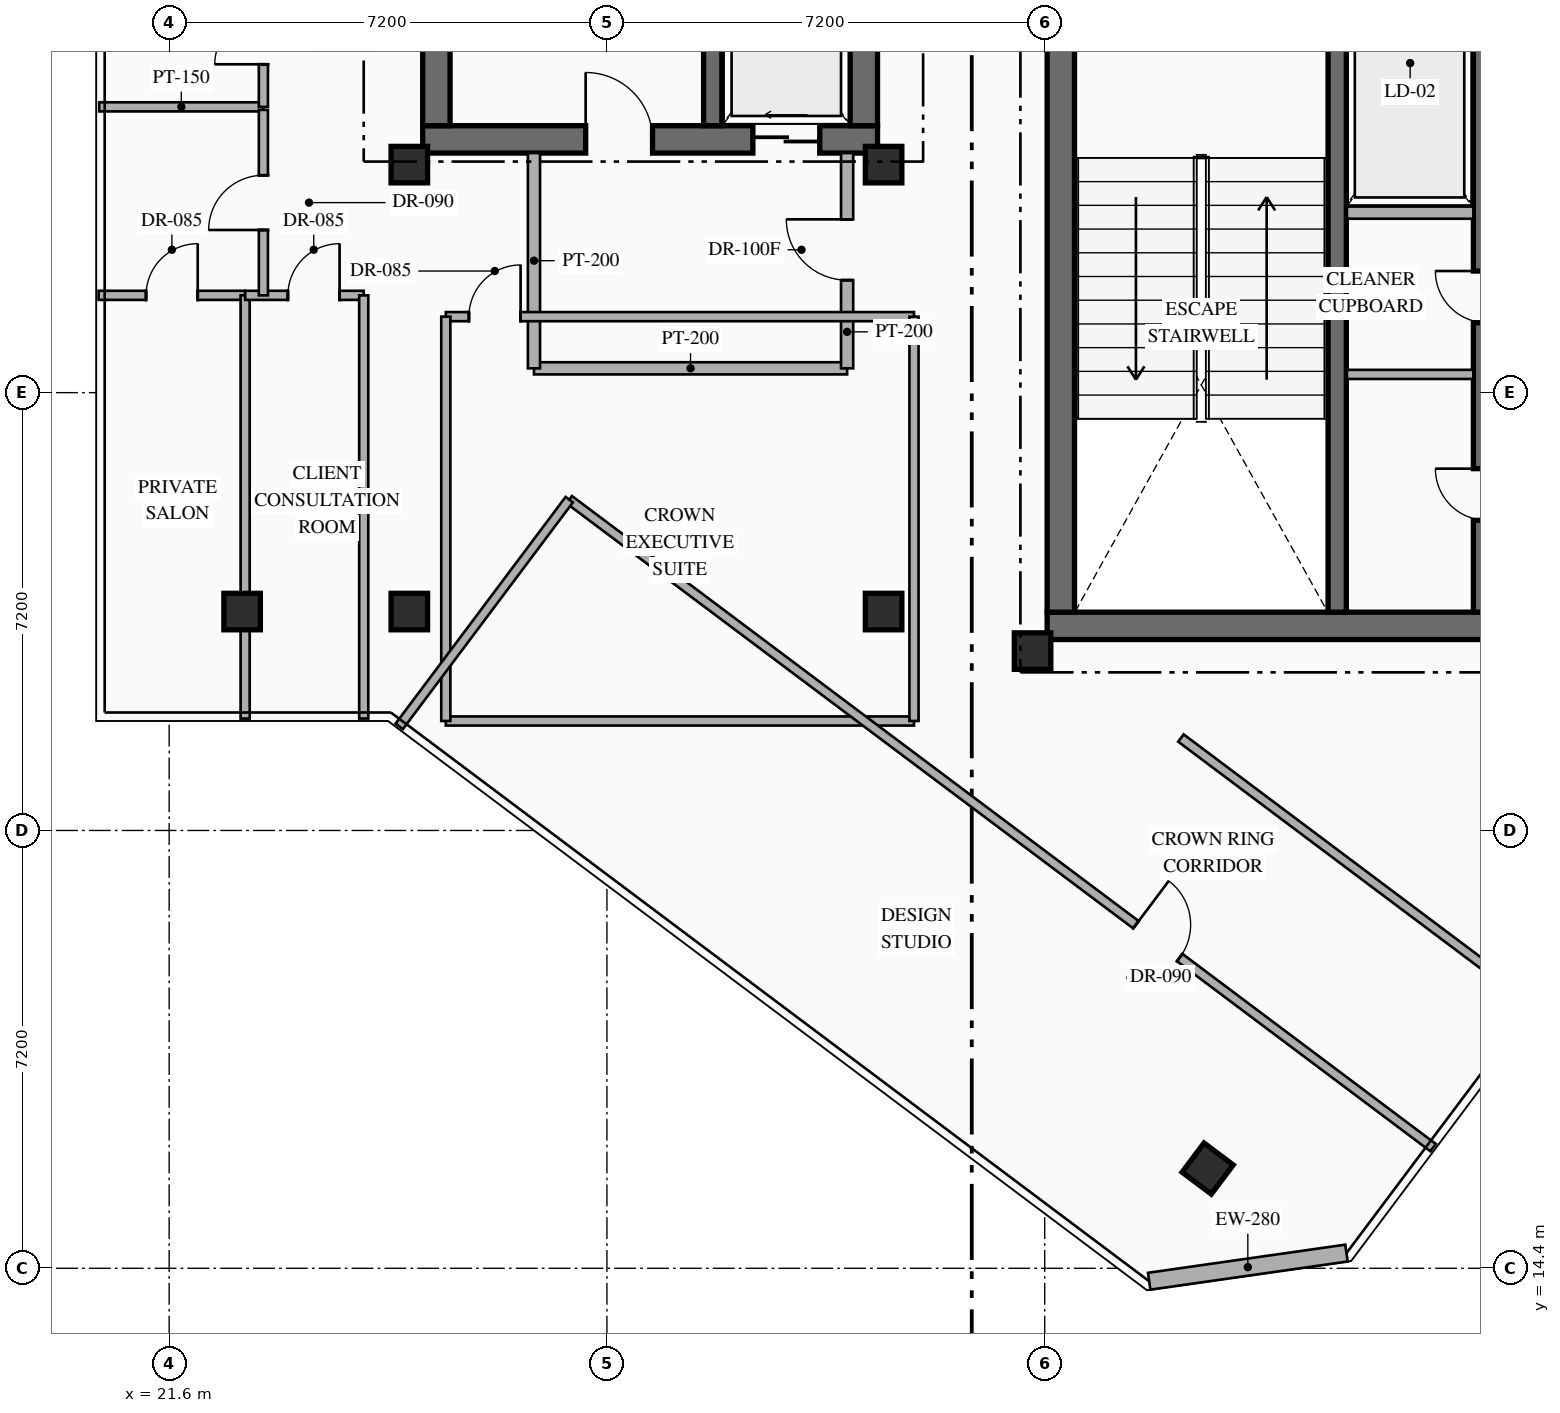
"""IFC4 building model, lengths in metres.
Left out: names, types, materials, properties, quantities, classifications, styles, units other than length and angle.
Written with IfcOpenShell. Run it as: python <this file> out.ifc"""

import sys

from ifc_helpers import new_model, si_unit, direction, frame, frame_2d, origin, origin_2d, place, context, subcontext, project, spatial, rectangle, hollow_rectangle, extrude, element, fill, save


model = new_model("IFC4")
c1 = context("Model", 3, precision=1e-05, world=origin(), true_north=direction((0.0, 1.0)))
c2 = subcontext(c1, "Body", "Model", "MODEL_VIEW")
j1 = project(units=[si_unit("LENGTHUNIT", "METRE"), si_unit("PLANEANGLEUNIT", "RADIAN")], contexts=[c1])
p1 = place(None, origin())
s1 = spatial("IfcSite", under=j1, at=p1, CompositionType="ELEMENT")
p2 = place(p1, origin())
s2 = spatial("IfcBuilding", under=s1, at=p2, CompositionType="ELEMENT")
p3 = place(p2, frame((0.0, 0.0, 277.95)))
s3 = spatial("IfcBuildingStorey", under=s2, at=p3, CompositionType="ELEMENT", Elevation=277.95)
p4 = place(p3, frame((25.77, 32.965, 0.0), z_axis=(0.0, 0.0, 1.0), x_axis=(1.0, 0.0, 0.0)))
e1 = element("IfcWall", 1, at=p4, inside=s3, PredefinedType="SHEAR", context=c2, shape_type="SweptSolid", body=[
    extrude(rectangle(XDim=7.48, YDim=0.45, at=frame_2d((3.74, 0.0))), origin(), (0.0, 0.0, 1.0), 4.0),
])
p5 = place(p4, frame((2.68, 0.0, 0.0)))
e2 = element("IfcOpeningElement", 2, at=p5, cuts=e1, PredefinedType="OPENING", context=c2, shape_type="SweptSolid", body=[
    extrude(rectangle(XDim=1.1, YDim=2.2, at=frame_2d((0.55, 1.1))), frame((0.0, 0.235, 0.0), z_axis=(0.0, -1.0, 0.0), x_axis=(1.0, 0.0, 0.0)), (0.0, 0.0, 1.0), 0.47),
])
p6 = place(p4, frame((5.43, 0.0, 0.0)))
e3 = element("IfcOpeningElement", 3, at=p6, cuts=e1, PredefinedType="OPENING", context=c2, shape_type="SweptSolid", body=[
    extrude(rectangle(XDim=1.1, YDim=2.15, at=frame_2d((0.55, 1.075))), frame((0.0, 0.235, 0.0), z_axis=(0.0, -1.0, 0.0), x_axis=(1.0, 0.0, 0.0)), (0.0, 0.0, 1.0), 0.47),
])
p7 = place(p3, frame((25.995, 33.19, 0.0), z_axis=(0.0, 0.0, 1.0), x_axis=(0.0, 1.0, 0.0)))
e4 = element("IfcWall", 4, at=p7, inside=s3, PredefinedType="SHEAR", context=c2, shape_type="SweptSolid", body=[
    extrude(rectangle(XDim=9.48, YDim=0.45, at=frame_2d((4.74, 0.0))), origin(), (0.0, 0.0, 1.0), 4.0),
])
p8 = place(p3, frame((33.025, 33.19, 0.0), z_axis=(0.0, 0.0, 1.0), x_axis=(0.0, 1.0, 0.0)))
e5 = element("IfcWall", 5, at=p8, inside=s3, PredefinedType="SHEAR", context=c2, shape_type="SweptSolid", body=[
    extrude(rectangle(XDim=9.48, YDim=0.45, at=frame_2d((4.74, 0.0))), origin(), (0.0, 0.0, 1.0), 4.0),
])
p9 = place(p8, frame((4.71, 0.0, 0.0)))
e6 = element("IfcOpeningElement", 6, at=p9, cuts=e5, PredefinedType="OPENING", context=c2, shape_type="SweptSolid", body=[
    extrude(rectangle(XDim=0.85, YDim=2.08, at=frame_2d((0.425, 1.04))), frame((0.0, 0.235, 0.0), z_axis=(0.0, -1.0, 0.0), x_axis=(1.0, 0.0, 0.0)), (0.0, 0.0, 1.0), 0.47),
])
p10 = place(p8, frame((7.76, 0.0, 0.0)))
e7 = element("IfcOpeningElement", 7, at=p10, cuts=e5, PredefinedType="OPENING", context=c2, shape_type="SweptSolid", body=[
    extrude(rectangle(XDim=0.85, YDim=2.08, at=frame_2d((0.425, 1.04))), frame((0.0, 0.235, 0.0), z_axis=(0.0, -1.0, 0.0), x_axis=(1.0, 0.0, 0.0)), (0.0, 0.0, 1.0), 0.47),
])
p11 = place(p3, frame((30.54, 33.19, 0.0), z_axis=(0.0, 0.0, 1.0), x_axis=(0.0, 1.0, 0.0)))
e8 = element("IfcWall", 8, at=p11, inside=s3, PredefinedType="SHEAR", context=c2, shape_type="SweptSolid", body=[
    extrude(rectangle(XDim=9.48, YDim=0.3, at=frame_2d((4.74, 0.0))), origin(), (0.0, 0.0, 1.0), 4.0),
])
p12 = place(p3, frame((36.04, 24.965, 0.0), z_axis=(0.0, 0.0, 1.0), x_axis=(1.0, 0.0, 0.0)))
e9 = element("IfcWall", 9, at=p12, inside=s3, PredefinedType="SHEAR", context=c2, shape_type="SweptSolid", body=[
    extrude(rectangle(XDim=7.46, YDim=0.45, at=frame_2d((3.73, 0.0))), origin(), (0.0, 0.0, 1.0), 4.0),
])
p13 = place(p3, frame((36.265, 25.19, 0.0), z_axis=(0.0, 0.0, 1.0), x_axis=(0.0, 1.0, 0.0)))
e10 = element("IfcWall", 10, at=p13, inside=s3, PredefinedType="SHEAR", context=c2, shape_type="SweptSolid", body=[
    extrude(rectangle(XDim=9.48, YDim=0.45, at=frame_2d((4.74, 0.0))), origin(), (0.0, 0.0, 1.0), 4.0),
])
p14 = place(p3, frame((43.275, 25.19, 0.0), z_axis=(0.0, 0.0, 1.0), x_axis=(0.0, 1.0, 0.0)))
e11 = element("IfcWall", 11, at=p14, inside=s3, PredefinedType="SHEAR", context=c2, shape_type="SweptSolid", body=[
    extrude(rectangle(XDim=9.48, YDim=0.45, at=frame_2d((4.74, 0.0))), origin(), (0.0, 0.0, 1.0), 4.0),
])
p15 = place(p14, frame((1.51, 0.0, 0.0)))
e12 = element("IfcOpeningElement", 12, at=p15, cuts=e11, PredefinedType="OPENING", context=c2, shape_type="SweptSolid", body=[
    extrude(rectangle(XDim=0.85, YDim=2.08, at=frame_2d((0.425, 1.04))), frame((0.0, 0.235, 0.0), z_axis=(0.0, -1.0, 0.0), x_axis=(1.0, 0.0, 0.0)), (0.0, 0.0, 1.0), 0.47),
])
p16 = place(p14, frame((4.76, 0.0, 0.0)))
e13 = element("IfcOpeningElement", 13, at=p16, cuts=e11, PredefinedType="OPENING", context=c2, shape_type="SweptSolid", body=[
    extrude(rectangle(XDim=0.85, YDim=2.08, at=frame_2d((0.425, 1.04))), frame((0.0, 0.235, 0.0), z_axis=(0.0, -1.0, 0.0), x_axis=(1.0, 0.0, 0.0)), (0.0, 0.0, 1.0), 0.47),
])
p17 = place(p3, frame((40.81, 25.19, 0.0), z_axis=(0.0, 0.0, 1.0), x_axis=(0.0, 1.0, 0.0)))
e14 = element("IfcWall", 14, at=p17, inside=s3, PredefinedType="SHEAR", context=c2, shape_type="SweptSolid", body=[
    extrude(rectangle(XDim=9.48, YDim=0.3, at=frame_2d((4.74, 0.0))), origin(), (0.0, 0.0, 1.0), 4.0),
])
for number, where, z_axis, x_axis in (
    (15, (25.55, 32.55, 0.0), (0.0, 0.0, 1.0), (1.0, 0.0, 0.0)),
    (16, (33.35, 32.55, 0.0), (0.0, 0.0, 1.0), (1.0, 0.0, 0.0)),
    (17, (35.8, 24.55, 0.0), (0.0, 0.0, 1.0), (1.0, 0.0, 0.0)),
    (18, (25.55, 25.2, 0.0), (0.0, 0.0, 1.0), (1.0, 0.0, 0.0)),
    (19, (33.35, 25.2, 0.0), (0.0, 0.0, 1.0), (1.0, 0.0, 0.0)),
    (20, (22.8, 25.2, 0.0), (0.0, 0.0, 1.0), (1.0, 0.0, 0.0)),
    (21, (38.68, 16.04, 0.0), (0.0, 0.0, 1.0), (0.8, -0.6, 0.0)),
):
    element("IfcColumn", number, at=place(p3, frame(where, z_axis=z_axis, x_axis=x_axis)), inside=s3, PredefinedType="COLUMN", context=c2, shape_type="SweptSolid", body=[
        extrude(hollow_rectangle(XDim=0.6, YDim=0.6, WallThickness=0.025, at=origin_2d()), origin(), (0.0, 0.0, 1.0), 4.0),
    ])
p18 = place(p3, frame((40.963, 14.65, 0.0), z_axis=(0.0, 0.0, 1.0), x_axis=(-0.989977778067, -0.141223223777, 0.0)))
e22 = element("IfcWall", 22, at=p18, inside=s3, PredefinedType="STANDARD", context=c2, shape_type="SweptSolid", body=[
    extrude(rectangle(XDim=3.278, YDim=0.28, at=frame_2d((1.639, 0.0))), origin(), (0.0, 0.0, 1.0), 3.74),
])
p19 = place(p3, frame((40.97, 31.76, 0.0), z_axis=(0.0, 0.0, 1.0), x_axis=(1.0, 0.0, 0.0)))
e23 = element("IfcWall", 23, at=p19, inside=s3, PredefinedType="STANDARD", context=c2, shape_type="SweptSolid", body=[
    extrude(rectangle(XDim=2.08, YDim=0.2, at=frame_2d((1.04, 0.0))), origin(), (0.0, 0.0, 1.0), 3.74),
])
p20 = place(p3, frame((40.97, 29.1, 0.0), z_axis=(0.0, 0.0, 1.0), x_axis=(1.0, 0.0, 0.0)))
e24 = element("IfcWall", 24, at=p20, inside=s3, PredefinedType="PARTITIONING", context=c2, shape_type="SweptSolid", body=[
    extrude(rectangle(XDim=2.08, YDim=0.15, at=frame_2d((1.04, 0.0))), origin(), (0.0, 0.0, 1.0), 3.74),
])
p21 = place(p3, frame((27.6, 29.2, 0.0), z_axis=(0.0, 0.0, 1.0), x_axis=(1.0, 0.0, 0.0)))
e25 = element("IfcWall", 25, at=p21, inside=s3, PredefinedType="STANDARD", context=c2, shape_type="SweptSolid", body=[
    extrude(rectangle(XDim=5.15, YDim=0.2, at=frame_2d((2.575, 0.0))), origin(), (0.0, 0.0, 1.0), 3.74),
])
p22 = place(p3, frame((27.6, 29.2, 0.0), z_axis=(0.0, 0.0, 1.0), x_axis=(0.0, 1.0, 0.0)))
e26 = element("IfcWall", 26, at=p22, inside=s3, PredefinedType="STANDARD", context=c2, shape_type="SweptSolid", body=[
    extrude(rectangle(XDim=3.54, YDim=0.2, at=frame_2d((1.77, 0.0))), origin(), (0.0, 0.0, 1.0), 3.74),
])
p23 = place(p3, frame((32.75, 29.2, 0.0), z_axis=(0.0, 0.0, 1.0), x_axis=(0.0, 1.0, 0.0)))
e27 = element("IfcWall", 27, at=p23, inside=s3, PredefinedType="STANDARD", context=c2, shape_type="SweptSolid", body=[
    extrude(rectangle(XDim=3.54, YDim=0.2, at=frame_2d((1.77, 0.0))), origin(), (0.0, 0.0, 1.0), 3.74),
])
p24 = place(p23, frame((1.45, 0.0, 0.0)))
e28 = element("IfcOpeningElement", 28, at=p24, cuts=e27, PredefinedType="OPENING", context=c2, shape_type="SweptSolid", body=[
    extrude(rectangle(XDim=1.0, YDim=2.2, at=frame_2d((0.5, 1.1))), frame((0.0, 0.11, 0.0), z_axis=(0.0, -1.0, 0.0), x_axis=(1.0, 0.0, 0.0)), (0.0, 0.0, 1.0), 0.22),
])
p25 = place(p3, frame((20.45, 33.5, 0.0), z_axis=(0.0, 0.0, 1.0), x_axis=(1.0, 0.0, 0.0)))
e29 = element("IfcWall", 29, at=p25, inside=s3, PredefinedType="PARTITIONING", context=c2, shape_type="SweptSolid", body=[
    extrude(rectangle(XDim=2.7, YDim=0.15, at=frame_2d((1.35, 0.0))), origin(), (0.0, 0.0, 1.0), 3.74),
])
p26 = place(p3, frame((23.15, 33.5, 0.0), z_axis=(0.0, 0.0, 1.0), x_axis=(0.0, 1.0, 0.0)))
e30 = element("IfcWall", 30, at=p26, inside=s3, PredefinedType="PARTITIONING", context=c2, shape_type="SweptSolid", body=[
    extrude(rectangle(XDim=2.2, YDim=0.15, at=frame_2d((1.1, 0.0))), origin(), (0.0, 0.0, 1.0), 3.74),
])
p27 = place(p26, frame((0.7, 0.0, 0.0)))
e31 = element("IfcOpeningElement", 31, at=p27, cuts=e30, PredefinedType="OPENING", context=c2, shape_type="SweptSolid", body=[
    extrude(rectangle(XDim=0.8, YDim=2.06, at=frame_2d((0.4, 1.03))), frame((0.0, 0.085, 0.0), z_axis=(0.0, -1.0, 0.0), x_axis=(1.0, 0.0, 0.0)), (0.0, 0.0, 1.0), 0.17),
])
p28 = place(p3, frame((26.15, 23.4, 0.0), z_axis=(0.0, 0.0, 1.0), x_axis=(1.0, 0.0, 0.0)))
e32 = element("IfcWall", 32, at=p28, inside=s3, PredefinedType="PARTITIONING", context=c2, shape_type="SweptSolid", body=[
    extrude(rectangle(XDim=7.7, YDim=0.15, at=frame_2d((3.85, 0.0))), origin(), (0.0, 0.0, 1.0), 3.74),
])
p29 = place(p3, frame((26.15, 30.05, 0.0), z_axis=(0.0, 0.0, 1.0), x_axis=(1.0, 0.0, 0.0)))
e33 = element("IfcWall", 33, at=p29, inside=s3, PredefinedType="PARTITIONING", context=c2, shape_type="SweptSolid", body=[
    extrude(rectangle(XDim=7.7, YDim=0.15, at=frame_2d((3.85, 0.0))), origin(), (0.0, 0.0, 1.0), 3.74),
])
p30 = place(p29, frame((0.38, 0.0, 0.0)))
e34 = element("IfcOpeningElement", 34, at=p30, cuts=e33, PredefinedType="OPENING", context=c2, shape_type="SweptSolid", body=[
    extrude(rectangle(XDim=0.85, YDim=2.08, at=frame_2d((0.425, 1.04))), frame((0.0, 0.085, 0.0), z_axis=(0.0, -1.0, 0.0), x_axis=(1.0, 0.0, 0.0)), (0.0, 0.0, 1.0), 0.17),
])
for number, where, z_axis, x_axis in (
    (35, (26.15, 23.4, 0.0), (0.0, 0.0, 1.0), (0.0, 1.0, 0.0)),
    (36, (33.85, 23.4, 0.0), (0.0, 0.0, 1.0), (0.0, 1.0, 0.0)),
):
    element("IfcWall", number, at=place(p3, frame(where, z_axis=z_axis, x_axis=x_axis)), inside=s3, PredefinedType="PARTITIONING", context=c2, shape_type="SweptSolid", body=[
        extrude(rectangle(XDim=6.65, YDim=0.15, at=frame_2d((3.325, 0.0))), origin(), (0.0, 0.0, 1.0), 3.74),
    ])
p31 = place(p3, frame((28.18, 27.04, 0.0), z_axis=(0.0, 0.0, 1.0), x_axis=(0.8, -0.6, 0.0)))
e37 = element("IfcWall", 37, at=p31, inside=s3, PredefinedType="PARTITIONING", context=c2, shape_type="SweptSolid", body=[
    extrude(rectangle(XDim=17.76, YDim=0.15, at=frame_2d((8.88, 0.0))), origin(), (0.0, 0.0, 1.0), 3.74),
])
p32 = place(p31, frame((11.65, 0.0, 0.0)))
e38 = element("IfcOpeningElement", 38, at=p32, cuts=e37, PredefinedType="OPENING", context=c2, shape_type="SweptSolid", body=[
    extrude(rectangle(XDim=0.9, YDim=2.15, at=frame_2d((0.45, 1.075))), frame((0.0, 0.085, 0.0), z_axis=(0.0, -1.0, 0.0), x_axis=(1.0, 0.0, 0.0)), (0.0, 0.0, 1.0), 0.17),
])
p33 = place(p3, frame((25.384, 23.312, 0.0), z_axis=(0.0, 0.0, 1.0), x_axis=(0.599983234706, 0.800012573696, 0.0)))
e39 = element("IfcWall", 39, at=p33, inside=s3, PredefinedType="PARTITIONING", context=c2, shape_type="SweptSolid", body=[
    extrude(rectangle(XDim=4.66, YDim=0.15, at=frame_2d((2.33, 0.0))), origin(), (0.0, 0.0, 1.0), 3.74),
])
p34 = place(p3, frame((20.44, 30.4, 0.0), z_axis=(0.0, 0.0, 1.0), x_axis=(1.0, 0.0, 0.0)))
e40 = element("IfcWall", 40, at=p34, inside=s3, PredefinedType="PARTITIONING", context=c2, shape_type="SweptSolid", body=[
    extrude(rectangle(XDim=2.41, YDim=0.15, at=frame_2d((1.205, 0.0))), origin(), (0.0, 0.0, 1.0), 3.74),
])
p35 = place(p34, frame((0.78, 0.0, 0.0)))
e41 = element("IfcOpeningElement", 41, at=p35, cuts=e40, PredefinedType="OPENING", context=c2, shape_type="SweptSolid", body=[
    extrude(rectangle(XDim=0.85, YDim=2.08, at=frame_2d((0.425, 1.04))), frame((0.0, 0.085, 0.0), z_axis=(0.0, -1.0, 0.0), x_axis=(1.0, 0.0, 0.0)), (0.0, 0.0, 1.0), 0.17),
])
p36 = place(p3, frame((22.85, 23.44, 0.0), z_axis=(0.0, 0.0, 1.0), x_axis=(0.0, 1.0, 0.0)))
e42 = element("IfcWall", 42, at=p36, inside=s3, PredefinedType="PARTITIONING", context=c2, shape_type="SweptSolid", body=[
    extrude(rectangle(XDim=6.96, YDim=0.15, at=frame_2d((3.48, 0.0))), origin(), (0.0, 0.0, 1.0), 3.295),
])
p37 = place(p3, frame((22.85, 30.4, 0.0), z_axis=(0.0, 0.0, 1.0), x_axis=(1.0, 0.0, 0.0)))
e43 = element("IfcWall", 43, at=p37, inside=s3, PredefinedType="PARTITIONING", context=c2, shape_type="SweptSolid", body=[
    extrude(rectangle(XDim=1.95, YDim=0.15, at=frame_2d((0.975, 0.0))), origin(), (0.0, 0.0, 1.0), 3.74),
])
p38 = place(p37, frame((0.703, 0.0, 0.0)))
e44 = element("IfcOpeningElement", 44, at=p38, cuts=e43, PredefinedType="OPENING", context=c2, shape_type="SweptSolid", body=[
    extrude(rectangle(XDim=0.85, YDim=2.08, at=frame_2d((0.425, 1.04))), frame((0.0, 0.085, 0.0), z_axis=(0.0, -1.0, 0.0), x_axis=(1.0, 0.0, 0.0)), (0.0, 0.0, 1.0), 0.17),
])
p39 = place(p3, frame((24.8, 23.44, 0.0), z_axis=(0.0, 0.0, 1.0), x_axis=(0.0, 1.0, 0.0)))
e45 = element("IfcWall", 45, at=p39, inside=s3, PredefinedType="PARTITIONING", context=c2, shape_type="SweptSolid", body=[
    extrude(rectangle(XDim=6.96, YDim=0.15, at=frame_2d((3.48, 0.0))), origin(), (0.0, 0.0, 1.0), 3.74),
])
p40 = place(p3, frame((23.15, 30.4, 0.0), z_axis=(0.0, 0.0, 1.0), x_axis=(0.0, 1.0, 0.0)))
e46 = element("IfcWall", 46, at=p40, inside=s3, PredefinedType="PARTITIONING", context=c2, shape_type="SweptSolid", body=[
    extrude(rectangle(XDim=3.05, YDim=0.15, at=frame_2d((1.525, 0.0))), origin(), (0.0, 0.0, 1.0), 3.74),
])
p41 = place(p40, frame((1.075, 0.0, 0.0)))
e47 = element("IfcOpeningElement", 47, at=p41, cuts=e46, PredefinedType="OPENING", context=c2, shape_type="SweptSolid", body=[
    extrude(rectangle(XDim=0.9, YDim=2.15, at=frame_2d((0.45, 1.075))), frame((0.0, 0.085, 0.0), z_axis=(0.0, -1.0, 0.0), x_axis=(1.0, 0.0, 0.0)), (0.0, 0.0, 1.0), 0.17),
])
p42 = place(p3, frame((38.24, 23.12, 0.0), z_axis=(0.0, 0.0, 1.0), x_axis=(0.799996019408, -0.60000530742, 0.0)))
e48 = element("IfcWall", 48, at=p42, inside=s3, PredefinedType="PARTITIONING", context=c2, shape_type="SweptSolid", body=[
    extrude(rectangle(XDim=7.36, YDim=0.15, at=frame_2d((3.68, 0.0))), origin(), (0.0, 0.0, 1.0), 3.74),
])
p43 = place(p3, frame((42.94, 36.72, 0.0), z_axis=(0.0, 0.0, 1.0), x_axis=(0.800013316712, -0.599982243973, 0.0)))
e49 = element("IfcWall", 49, at=p43, inside=s3, PredefinedType="PARTITIONING", context=c2, shape_type="SweptSolid", body=[
    extrude(rectangle(XDim=4.4, YDim=0.15, at=frame_2d((2.2, 0.0))), origin(), (0.0, 0.0, 1.0), 3.295),
])
p44 = place(p5, origin())
e50 = element("IfcDoor", 50, at=p44, inside=s3, OperationType="SINGLE_SWING_LEFT", PredefinedType="DOOR", context=c2, shape_type="SweptSolid", body=[
    extrude(rectangle(XDim=1.1, YDim=2.2, at=frame_2d((0.55, 1.1))), frame((0.0, 0.025, 0.0), z_axis=(0.0, -1.0, 0.0), x_axis=(1.0, 0.0, 0.0)), (0.0, 0.0, 1.0), 0.05),
])
fill(e2, e50)
p45 = place(p6, origin())
e51 = element("IfcDoor", 51, at=p45, inside=s3, OperationType="SLIDING_TO_LEFT", PredefinedType="USERDEFINED", context=c2, shape_type="SweptSolid", body=[
    extrude(rectangle(XDim=1.1, YDim=2.15, at=frame_2d((0.55, 1.075))), frame((0.0, 0.025, 0.0), z_axis=(0.0, -1.0, 0.0), x_axis=(1.0, 0.0, 0.0)), (0.0, 0.0, 1.0), 0.05),
])
fill(e3, e51)
p46 = place(p24, origin())
e52 = element("IfcDoor", 52, at=p46, inside=s3, OperationType="SINGLE_SWING_RIGHT", PredefinedType="DOOR", context=c2, shape_type="SweptSolid", body=[
    extrude(rectangle(XDim=1.0, YDim=2.2, at=frame_2d((0.5, 1.1))), frame((0.0, 0.025, 0.0), z_axis=(0.0, -1.0, 0.0), x_axis=(1.0, 0.0, 0.0)), (0.0, 0.0, 1.0), 0.05),
])
fill(e28, e52)
p47 = place(p27, origin())
e53 = element("IfcDoor", 53, at=p47, inside=s3, OperationType="SINGLE_SWING_LEFT", PredefinedType="DOOR", context=c2, shape_type="SweptSolid", body=[
    extrude(rectangle(XDim=0.8, YDim=2.06, at=frame_2d((0.4, 1.03))), frame((0.0, 0.025, 0.0), z_axis=(0.0, -1.0, 0.0), x_axis=(1.0, 0.0, 0.0)), (0.0, 0.0, 1.0), 0.05),
])
fill(e31, e53)
p48 = place(p30, origin())
e54 = element("IfcDoor", 54, at=p48, inside=s3, OperationType="SINGLE_SWING_RIGHT", PredefinedType="DOOR", context=c2, shape_type="SweptSolid", body=[
    extrude(rectangle(XDim=0.85, YDim=2.08, at=frame_2d((0.425, 1.04))), frame((0.0, 0.025, 0.0), z_axis=(0.0, -1.0, 0.0), x_axis=(1.0, 0.0, 0.0)), (0.0, 0.0, 1.0), 0.05),
])
fill(e34, e54)
p49 = place(p32, origin())
e55 = element("IfcDoor", 55, at=p49, inside=s3, OperationType="SINGLE_SWING_LEFT", PredefinedType="DOOR", context=c2, shape_type="SweptSolid", body=[
    extrude(rectangle(XDim=0.9, YDim=2.15, at=frame_2d((0.45, 1.075))), frame((0.0, 0.025, 0.0), z_axis=(0.0, -1.0, 0.0), x_axis=(1.0, 0.0, 0.0)), (0.0, 0.0, 1.0), 0.05),
])
fill(e38, e55)
p50 = place(p35, origin())
e56 = element("IfcDoor", 56, at=p50, inside=s3, OperationType="SINGLE_SWING_RIGHT", PredefinedType="DOOR", context=c2, shape_type="SweptSolid", body=[
    extrude(rectangle(XDim=0.85, YDim=2.08, at=frame_2d((0.425, 1.04))), frame((0.0, 0.025, 0.0), z_axis=(0.0, -1.0, 0.0), x_axis=(1.0, 0.0, 0.0)), (0.0, 0.0, 1.0), 0.05),
])
fill(e41, e56)
p51 = place(p38, origin())
e57 = element("IfcDoor", 57, at=p51, inside=s3, OperationType="SINGLE_SWING_RIGHT", PredefinedType="DOOR", context=c2, shape_type="SweptSolid", body=[
    extrude(rectangle(XDim=0.85, YDim=2.08, at=frame_2d((0.425, 1.04))), frame((0.0, 0.025, 0.0), z_axis=(0.0, -1.0, 0.0), x_axis=(1.0, 0.0, 0.0)), (0.0, 0.0, 1.0), 0.05),
])
fill(e44, e57)
p52 = place(p41, origin())
e58 = element("IfcDoor", 58, at=p52, inside=s3, OperationType="SINGLE_SWING_LEFT", PredefinedType="DOOR", context=c2, shape_type="SweptSolid", body=[
    extrude(rectangle(XDim=0.9, YDim=2.15, at=frame_2d((0.45, 1.075))), frame((0.0, 0.025, 0.0), z_axis=(0.0, -1.0, 0.0), x_axis=(1.0, 0.0, 0.0)), (0.0, 0.0, 1.0), 0.05),
])
fill(e47, e58)
save(model, sys.argv[1])
